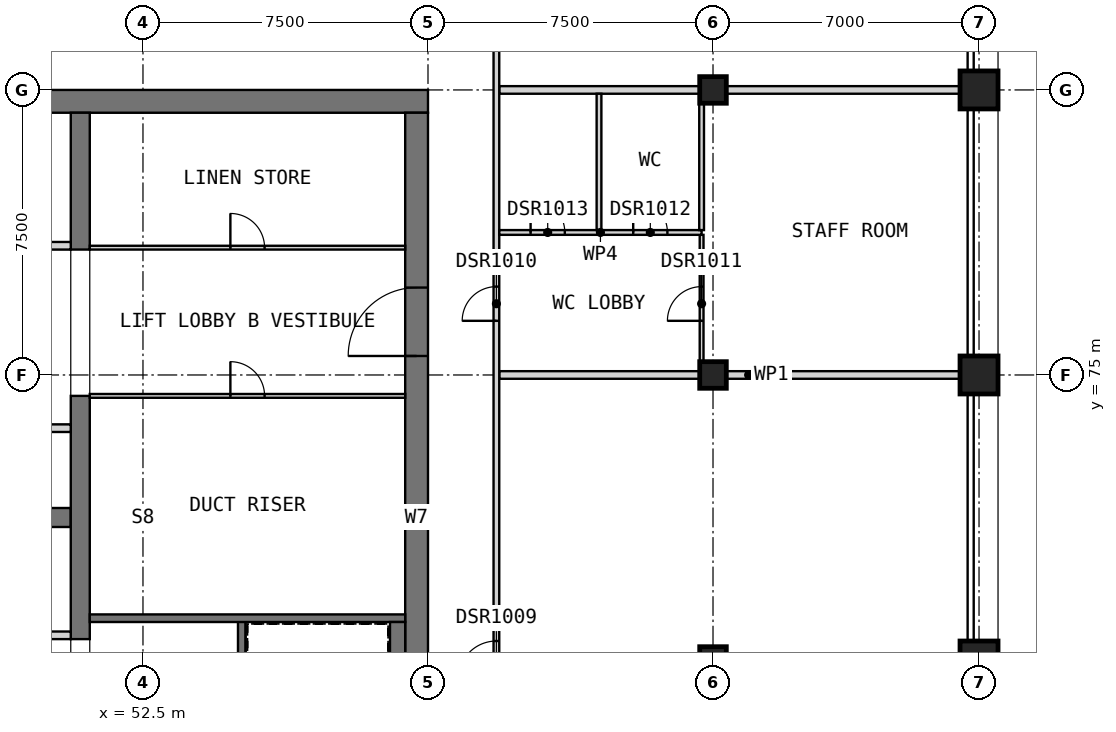
"""IFC4 building model, lengths in metres.
Left out: names, types, materials, properties, quantities, classifications, styles, units other than length and angle.
Written with IfcOpenShell. Run it as: python <this file> out.ifc"""

import sys

from ifc_helpers import new_model, si_unit, direction, frame, frame_2d, origin, origin_2d, place, context, subcontext, project, spatial, rectangle, extrude, element, fill, save


model = new_model("IFC4")
c1 = context("Model", 3, precision=1e-05, world=origin(), true_north=direction((0.0, 1.0)))
c2 = subcontext(c1, "Body", "Model", "MODEL_VIEW")
j1 = project(units=[si_unit("LENGTHUNIT", "METRE"), si_unit("PLANEANGLEUNIT", "RADIAN")], contexts=[c1])
p1 = place(None, origin())
s1 = spatial("IfcSite", under=j1, at=p1, CompositionType="ELEMENT")
p2 = place(p1, origin())
s2 = spatial("IfcBuilding", under=s1, at=p2, CompositionType="ELEMENT")
p3 = place(p2, frame((0.0, 0.0, 292.2)))
s3 = spatial("IfcBuildingStorey", under=s2, at=p3, CompositionType="ELEMENT", Elevation=292.2)
for number, where, z_axis, x_axis in (
    (1, (67.5, 67.5, 0.0), (0.0, 0.0, 1.0), (1.0, 0.0, 0.0)),
    (2, (67.5, 75.0, 0.0), (0.0, 0.0, 1.0), (1.0, 0.0, 0.0)),
    (3, (67.5, 82.5, 0.0), (0.0, 0.0, 1.0), (1.0, 0.0, 0.0)),
):
    element("IfcColumn", number, at=place(p3, frame(where, z_axis=z_axis, x_axis=x_axis)), inside=s3, PredefinedType="COLUMN", context=c2, shape_type="SweptSolid", body=[
        extrude(rectangle(XDim=0.7, YDim=0.7, at=origin_2d()), origin(), (0.0, 0.0, 1.0), 5.5),
    ])
for number, where, z_axis, x_axis in (
    (4, (74.5, 67.5, 0.0), (0.0, 0.0, 1.0), (1.0, 0.0, 0.0)),
    (5, (74.5, 75.0, 0.0), (0.0, 0.0, 1.0), (1.0, 0.0, 0.0)),
    (6, (74.5, 82.5, 0.0), (0.0, 0.0, 1.0), (1.0, 0.0, 0.0)),
):
    element("IfcColumn", number, at=place(p3, frame(where, z_axis=z_axis, x_axis=x_axis)), inside=s3, PredefinedType="COLUMN", context=c2, shape_type="SweptSolid", body=[
        extrude(rectangle(XDim=1.0, YDim=1.0, at=origin_2d()), origin(), (0.0, 0.0, 1.0), 5.5),
    ])
p4 = place(p3, frame((30.0, 82.2, 0.0), z_axis=(0.0, 0.0, 1.0), x_axis=(1.0, 0.0, 0.0)))
e7 = element("IfcWall", 7, at=p4, inside=s3, PredefinedType="SHEAR", context=c2, shape_type="SweptSolid", body=[
    extrude(rectangle(XDim=30.0, YDim=0.6, at=frame_2d((15.0, 0.0))), origin(), (0.0, 0.0, 1.0), 5.5),
])
p5 = place(p3, frame((59.7, 60.6, 0.0), z_axis=(0.0, 0.0, 1.0), x_axis=(0.0, 1.0, 0.0)))
e8 = element("IfcWall", 8, at=p5, inside=s3, PredefinedType="SHEAR", context=c2, shape_type="SweptSolid", body=[
    extrude(rectangle(XDim=21.3, YDim=0.6, at=frame_2d((10.65, 0.0))), origin(), (0.0, 0.0, 1.0), 5.5),
])
p6 = place(p5, frame((14.9, 0.0, 0.0)))
e9 = element("IfcOpeningElement", 9, at=p6, cuts=e8, PredefinedType="OPENING", context=c2, shape_type="SweptSolid", body=[
    extrude(rectangle(XDim=1.8, YDim=2.1, at=frame_2d((0.9, 1.05))), frame((0.0, 0.31, 0.0), z_axis=(0.0, -1.0, 0.0), x_axis=(1.0, 0.0, 0.0)), (0.0, 0.0, 1.0), 0.62),
])
p7 = place(p3, frame((35.0, 71.25, 0.0), z_axis=(0.0, 0.0, 1.0), x_axis=(1.0, 0.0, 0.0)))
e10 = element("IfcWall", 10, at=p7, inside=s3, PredefinedType="SHEAR", context=c2, shape_type="SweptSolid", body=[
    extrude(rectangle(XDim=15.6, YDim=0.5, at=frame_2d((7.8, 0.0))), origin(), (0.0, 0.0, 1.0), 5.5),
])
p8 = place(p3, frame((50.85, 68.05, 0.0), z_axis=(0.0, 0.0, 1.0), x_axis=(0.0, 1.0, 0.0)))
e11 = element("IfcWall", 11, at=p8, inside=s3, PredefinedType="SHEAR", context=c2, shape_type="SweptSolid", body=[
    extrude(rectangle(XDim=6.4, YDim=0.5, at=frame_2d((3.2, 0.0))), origin(), (0.0, 0.0, 1.0), 5.5),
])
p9 = place(p3, frame((50.85, 78.3, 0.0), z_axis=(0.0, 0.0, 1.0), x_axis=(0.0, 1.0, 0.0)))
e12 = element("IfcWall", 12, at=p9, inside=s3, PredefinedType="SHEAR", context=c2, shape_type="SweptSolid", body=[
    extrude(rectangle(XDim=3.6, YDim=0.5, at=frame_2d((1.8, 0.0))), origin(), (0.0, 0.0, 1.0), 5.5),
])
p10 = place(p3, frame((35.0, 68.15, 0.0), z_axis=(0.0, 0.0, 1.0), x_axis=(1.0, 0.0, 0.0)))
e13 = element("IfcWall", 13, at=p10, inside=s3, PredefinedType="PARTITIONING", context=c2, shape_type="SweptSolid", body=[
    extrude(rectangle(XDim=15.6, YDim=0.2, at=frame_2d((7.8, 0.0))), origin(), (0.0, 0.0, 1.0), 5.2),
])
p11 = place(p10, frame((2.675, 0.0, 0.0)))
e14 = element("IfcOpeningElement", 14, at=p11, cuts=e13, PredefinedType="OPENING", context=c2, shape_type="SweptSolid", body=[
    extrude(rectangle(XDim=0.9, YDim=2.1, at=frame_2d((0.45, 1.05))), frame((0.0, 0.11, 0.0), z_axis=(0.0, -1.0, 0.0), x_axis=(1.0, 0.0, 0.0)), (0.0, 0.0, 1.0), 0.22),
])
p12 = place(p10, frame((10.475, 0.0, 0.0)))
e15 = element("IfcOpeningElement", 15, at=p12, cuts=e13, PredefinedType="OPENING", context=c2, shape_type="SweptSolid", body=[
    extrude(rectangle(XDim=0.9, YDim=2.1, at=frame_2d((0.45, 1.05))), frame((0.0, 0.11, 0.0), z_axis=(0.0, -1.0, 0.0), x_axis=(1.0, 0.0, 0.0)), (0.0, 0.0, 1.0), 0.22),
])
p13 = place(p3, frame((35.0, 73.6, 0.0), z_axis=(0.0, 0.0, 1.0), x_axis=(1.0, 0.0, 0.0)))
e16 = element("IfcWall", 16, at=p13, inside=s3, PredefinedType="SOLIDWALL", context=c2, shape_type="SweptSolid", body=[
    extrude(rectangle(XDim=15.6, YDim=0.2, at=frame_2d((7.8, 0.0))), origin(), (0.0, 0.0, 1.0), 5.5),
])
p14 = place(p13, frame((0.75, 0.0, 0.0)))
e17 = element("IfcOpeningElement", 17, at=p14, cuts=e16, PredefinedType="OPENING", context=c2, shape_type="SweptSolid", body=[
    extrude(rectangle(XDim=1.1, YDim=2.1, at=frame_2d((0.55, 1.05))), frame((0.0, 0.11, 0.0), z_axis=(0.0, -1.0, 0.0), x_axis=(1.0, 0.0, 0.0)), (0.0, 0.0, 1.0), 0.22),
])
p15 = place(p13, frame((3.35, 0.0, 0.0)))
e18 = element("IfcOpeningElement", 18, at=p15, cuts=e16, PredefinedType="OPENING", context=c2, shape_type="SweptSolid", body=[
    extrude(rectangle(XDim=1.1, YDim=2.1, at=frame_2d((0.55, 1.05))), frame((0.0, 0.11, 0.0), z_axis=(0.0, -1.0, 0.0), x_axis=(1.0, 0.0, 0.0)), (0.0, 0.0, 1.0), 0.22),
])
p16 = place(p13, frame((5.95, 0.0, 0.0)))
e19 = element("IfcOpeningElement", 19, at=p16, cuts=e16, PredefinedType="OPENING", context=c2, shape_type="SweptSolid", body=[
    extrude(rectangle(XDim=1.1, YDim=2.1, at=frame_2d((0.55, 1.05))), frame((0.0, 0.11, 0.0), z_axis=(0.0, -1.0, 0.0), x_axis=(1.0, 0.0, 0.0)), (0.0, 0.0, 1.0), 0.22),
])
p17 = place(p13, frame((8.55, 0.0, 0.0)))
e20 = element("IfcOpeningElement", 20, at=p17, cuts=e16, PredefinedType="OPENING", context=c2, shape_type="SweptSolid", body=[
    extrude(rectangle(XDim=1.1, YDim=2.1, at=frame_2d((0.55, 1.05))), frame((0.0, 0.11, 0.0), z_axis=(0.0, -1.0, 0.0), x_axis=(1.0, 0.0, 0.0)), (0.0, 0.0, 1.0), 0.22),
])
p18 = place(p13, frame((11.15, 0.0, 0.0)))
e21 = element("IfcOpeningElement", 21, at=p18, cuts=e16, PredefinedType="OPENING", context=c2, shape_type="SweptSolid", body=[
    extrude(rectangle(XDim=1.1, YDim=2.1, at=frame_2d((0.55, 1.05))), frame((0.0, 0.11, 0.0), z_axis=(0.0, -1.0, 0.0), x_axis=(1.0, 0.0, 0.0)), (0.0, 0.0, 1.0), 0.22),
])
p19 = place(p13, frame((13.75, 0.0, 0.0)))
e22 = element("IfcOpeningElement", 22, at=p19, cuts=e16, PredefinedType="OPENING", context=c2, shape_type="SweptSolid", body=[
    extrude(rectangle(XDim=1.1, YDim=2.1, at=frame_2d((0.55, 1.05))), frame((0.0, 0.11, 0.0), z_axis=(0.0, -1.0, 0.0), x_axis=(1.0, 0.0, 0.0)), (0.0, 0.0, 1.0), 0.22),
])
p20 = place(p3, frame((35.0, 78.4, 0.0), z_axis=(0.0, 0.0, 1.0), x_axis=(1.0, 0.0, 0.0)))
e23 = element("IfcWall", 23, at=p20, inside=s3, PredefinedType="SOLIDWALL", context=c2, shape_type="SweptSolid", body=[
    extrude(rectangle(XDim=15.6, YDim=0.2, at=frame_2d((7.8, 0.0))), origin(), (0.0, 0.0, 1.0), 5.5),
])
p21 = place(p20, frame((0.75, 0.0, 0.0)))
e24 = element("IfcOpeningElement", 24, at=p21, cuts=e23, PredefinedType="OPENING", context=c2, shape_type="SweptSolid", body=[
    extrude(rectangle(XDim=1.1, YDim=2.1, at=frame_2d((0.55, 1.05))), frame((0.0, 0.11, 0.0), z_axis=(0.0, -1.0, 0.0), x_axis=(1.0, 0.0, 0.0)), (0.0, 0.0, 1.0), 0.22),
])
p22 = place(p20, frame((3.35, 0.0, 0.0)))
e25 = element("IfcOpeningElement", 25, at=p22, cuts=e23, PredefinedType="OPENING", context=c2, shape_type="SweptSolid", body=[
    extrude(rectangle(XDim=1.1, YDim=2.1, at=frame_2d((0.55, 1.05))), frame((0.0, 0.11, 0.0), z_axis=(0.0, -1.0, 0.0), x_axis=(1.0, 0.0, 0.0)), (0.0, 0.0, 1.0), 0.22),
])
p23 = place(p20, frame((11.15, 0.0, 0.0)))
e26 = element("IfcOpeningElement", 26, at=p23, cuts=e23, PredefinedType="OPENING", context=c2, shape_type="SweptSolid", body=[
    extrude(rectangle(XDim=1.1, YDim=2.1, at=frame_2d((0.55, 1.05))), frame((0.0, 0.11, 0.0), z_axis=(0.0, -1.0, 0.0), x_axis=(1.0, 0.0, 0.0)), (0.0, 0.0, 1.0), 0.22),
])
p24 = place(p20, frame((13.75, 0.0, 0.0)))
e27 = element("IfcOpeningElement", 27, at=p24, cuts=e23, PredefinedType="OPENING", context=c2, shape_type="SweptSolid", body=[
    extrude(rectangle(XDim=1.1, YDim=2.1, at=frame_2d((0.55, 1.05))), frame((0.0, 0.11, 0.0), z_axis=(0.0, -1.0, 0.0), x_axis=(1.0, 0.0, 0.0)), (0.0, 0.0, 1.0), 0.22),
])
p25 = place(p3, frame((55.1, 60.6, 0.0), z_axis=(0.0, 0.0, 1.0), x_axis=(0.0, 1.0, 0.0)))
e28 = element("IfcWall", 28, at=p25, inside=s3, PredefinedType="SOLIDWALL", context=c2, shape_type="SweptSolid", body=[
    extrude(rectangle(XDim=8.0, YDim=0.2, at=frame_2d((4.0, 0.0))), origin(), (0.0, 0.0, 1.0), 5.2),
])
p26 = place(p3, frame((51.1, 68.6, 0.0), z_axis=(0.0, 0.0, 1.0), x_axis=(1.0, 0.0, 0.0)))
e29 = element("IfcWall", 29, at=p26, inside=s3, PredefinedType="SOLIDWALL", context=c2, shape_type="SweptSolid", body=[
    extrude(rectangle(XDim=8.3, YDim=0.2, at=frame_2d((4.15, 0.0))), origin(), (0.0, 0.0, 1.0), 5.2),
])
p27 = place(p3, frame((59.2, 60.6, 0.0), z_axis=(0.0, 0.0, 1.0), x_axis=(0.0, 1.0, 0.0)))
e30 = element("IfcWall", 30, at=p27, inside=s3, PredefinedType="SOLIDWALL", context=c2, shape_type="SweptSolid", body=[
    extrude(rectangle(XDim=7.9, YDim=0.4, at=frame_2d((3.95, 0.0))), origin(), (0.0, 0.0, 1.0), 5.2),
])
p28 = place(p3, frame((51.1, 74.45, 0.0), z_axis=(0.0, 0.0, 1.0), x_axis=(1.0, 0.0, 0.0)))
e31 = element("IfcWall", 31, at=p28, inside=s3, PredefinedType="PARTITIONING", context=c2, shape_type="SweptSolid", body=[
    extrude(rectangle(XDim=8.3, YDim=0.1, at=frame_2d((4.15, 0.0))), origin(), (0.0, 0.0, 1.0), 5.2),
])
p29 = place(p28, frame((3.7, 0.0, 0.0)))
e32 = element("IfcOpeningElement", 32, at=p29, cuts=e31, PredefinedType="OPENING", context=c2, shape_type="SweptSolid", body=[
    extrude(rectangle(XDim=0.9, YDim=2.1, at=frame_2d((0.45, 1.05))), frame((0.0, 0.06, 0.0), z_axis=(0.0, -1.0, 0.0), x_axis=(1.0, 0.0, 0.0)), (0.0, 0.0, 1.0), 0.12),
])
p30 = place(p3, frame((51.1, 78.35, 0.0), z_axis=(0.0, 0.0, 1.0), x_axis=(1.0, 0.0, 0.0)))
e33 = element("IfcWall", 33, at=p30, inside=s3, PredefinedType="PARTITIONING", context=c2, shape_type="SweptSolid", body=[
    extrude(rectangle(XDim=8.3, YDim=0.1, at=frame_2d((4.15, 0.0))), origin(), (0.0, 0.0, 1.0), 5.2),
])
p31 = place(p30, frame((3.7, 0.0, 0.0)))
e34 = element("IfcOpeningElement", 34, at=p31, cuts=e33, PredefinedType="OPENING", context=c2, shape_type="SweptSolid", body=[
    extrude(rectangle(XDim=0.9, YDim=2.1, at=frame_2d((0.45, 1.05))), frame((0.0, 0.06, 0.0), z_axis=(0.0, -1.0, 0.0), x_axis=(1.0, 0.0, 0.0)), (0.0, 0.0, 1.0), 0.12),
])
for number, where, z_axis, x_axis in (
    (35, (61.875, 75.0, 0.0), (0.0, 0.0, 1.0), (1.0, 0.0, 0.0)),
    (36, (61.875, 82.5, 0.0), (0.0, 0.0, 1.0), (1.0, 0.0, 0.0)),
):
    element("IfcWall", number, at=place(p3, frame(where, z_axis=z_axis, x_axis=x_axis)), inside=s3, PredefinedType="PARTITIONING", context=c2, shape_type="SweptSolid", body=[
        extrude(rectangle(XDim=13.125, YDim=0.2, at=frame_2d((6.562, 0.0))), origin(), (0.0, 0.0, 1.0), 5.2),
    ])
p32 = place(p3, frame((61.8, 58.275, 0.0), z_axis=(0.0, 0.0, 1.0), x_axis=(0.0, 1.0, 0.0)))
e37 = element("IfcWall", 37, at=p32, inside=s3, PredefinedType="PARTITIONING", context=c2, shape_type="SweptSolid", body=[
    extrude(rectangle(XDim=25.95, YDim=0.15, at=frame_2d((12.975, 0.0))), origin(), (0.0, 0.0, 1.0), 5.2),
])
p33 = place(p32, frame((8.725, 0.0, 0.0)))
e38 = element("IfcOpeningElement", 38, at=p33, cuts=e37, PredefinedType="OPENING", context=c2, shape_type="SweptSolid", body=[
    extrude(rectangle(XDim=1.0, YDim=2.1, at=frame_2d((0.5, 1.05))), frame((0.0, 0.085, 0.0), z_axis=(0.0, -1.0, 0.0), x_axis=(1.0, 0.0, 0.0)), (0.0, 0.0, 1.0), 0.17),
])
p34 = place(p32, frame((18.15, 0.0, 0.0)))
e39 = element("IfcOpeningElement", 39, at=p34, cuts=e37, PredefinedType="OPENING", context=c2, shape_type="SweptSolid", body=[
    extrude(rectangle(XDim=0.9, YDim=2.1, at=frame_2d((0.45, 1.05))), frame((0.0, 0.085, 0.0), z_axis=(0.0, -1.0, 0.0), x_axis=(1.0, 0.0, 0.0)), (0.0, 0.0, 1.0), 0.17),
])
p35 = place(p3, frame((67.2, 75.1, 0.0), z_axis=(0.0, 0.0, 1.0), x_axis=(0.0, 1.0, 0.0)))
e40 = element("IfcWall", 40, at=p35, inside=s3, PredefinedType="PARTITIONING", context=c2, shape_type="SweptSolid", body=[
    extrude(rectangle(XDim=3.587, YDim=0.1, at=frame_2d((1.794, 0.0))), origin(), (0.0, 0.0, 1.0), 5.2),
])
p36 = place(p35, frame((1.325, 0.0, 0.0)))
e41 = element("IfcOpeningElement", 41, at=p36, cuts=e40, PredefinedType="OPENING", context=c2, shape_type="SweptSolid", body=[
    extrude(rectangle(XDim=0.9, YDim=2.1, at=frame_2d((0.45, 1.05))), frame((0.0, 0.06, 0.0), z_axis=(0.0, -1.0, 0.0), x_axis=(1.0, 0.0, 0.0)), (0.0, 0.0, 1.0), 0.12),
])
p37 = place(p3, frame((61.875, 78.75, 0.0), z_axis=(0.0, 0.0, 1.0), x_axis=(1.0, 0.0, 0.0)))
e42 = element("IfcWall", 42, at=p37, inside=s3, PredefinedType="PARTITIONING", context=c2, shape_type="SweptSolid", body=[
    extrude(rectangle(XDim=5.325, YDim=0.125, at=frame_2d((2.663, 0.0))), origin(), (0.0, 0.0, 1.0), 5.2),
])
p38 = place(p37, frame((3.525, 0.0, 0.0)))
e43 = element("IfcOpeningElement", 43, at=p38, cuts=e42, PredefinedType="OPENING", context=c2, shape_type="SweptSolid", body=[
    extrude(rectangle(XDim=0.9, YDim=2.1, at=frame_2d((0.45, 1.05))), frame((0.0, 0.073, 0.0), z_axis=(0.0, -1.0, 0.0), x_axis=(1.0, 0.0, 0.0)), (0.0, 0.0, 1.0), 0.145),
])
p39 = place(p37, frame((0.825, 0.0, 0.0)))
e44 = element("IfcOpeningElement", 44, at=p39, cuts=e42, PredefinedType="OPENING", context=c2, shape_type="SweptSolid", body=[
    extrude(rectangle(XDim=0.9, YDim=2.1, at=frame_2d((0.45, 1.05))), frame((0.0, 0.073, 0.0), z_axis=(0.0, -1.0, 0.0), x_axis=(1.0, 0.0, 0.0)), (0.0, 0.0, 1.0), 0.145),
])
for number, where, z_axis, x_axis in (
    (45, (64.5, 78.812, 0.0), (0.0, 0.0, 1.0), (0.0, 1.0, 0.0)),
    (46, (67.2, 78.812, 0.0), (0.0, 0.0, 1.0), (0.0, 1.0, 0.0)),
):
    element("IfcWall", number, at=place(p3, frame(where, z_axis=z_axis, x_axis=x_axis)), inside=s3, PredefinedType="PARTITIONING", context=c2, shape_type="SweptSolid", body=[
        extrude(rectangle(XDim=3.587, YDim=0.125, at=frame_2d((1.794, 0.0))), origin(), (0.0, 0.0, 1.0), 5.2),
    ])
p40 = place(p6, origin())
e47 = element("IfcDoor", 47, at=p40, inside=s3, OperationType="DOUBLE_DOOR_SINGLE_SWING", PredefinedType="DOOR", context=c2, shape_type="SweptSolid", body=[
    extrude(rectangle(XDim=1.8, YDim=2.1, at=frame_2d((0.9, 1.05))), frame((0.0, 0.025, 0.0), z_axis=(0.0, -1.0, 0.0), x_axis=(1.0, 0.0, 0.0)), (0.0, 0.0, 1.0), 0.05),
])
fill(e9, e47)
p41 = place(p29, origin())
e48 = element("IfcDoor", 48, at=p41, inside=s3, OperationType="SINGLE_SWING_LEFT", PredefinedType="DOOR", context=c2, shape_type="SweptSolid", body=[
    extrude(rectangle(XDim=0.9, YDim=2.1, at=frame_2d((0.45, 1.05))), frame((0.0, 0.025, 0.0), z_axis=(0.0, -1.0, 0.0), x_axis=(1.0, 0.0, 0.0)), (0.0, 0.0, 1.0), 0.05),
])
fill(e32, e48)
p42 = place(p31, origin())
e49 = element("IfcDoor", 49, at=p42, inside=s3, OperationType="SINGLE_SWING_LEFT", PredefinedType="DOOR", context=c2, shape_type="SweptSolid", body=[
    extrude(rectangle(XDim=0.9, YDim=2.1, at=frame_2d((0.45, 1.05))), frame((0.0, 0.025, 0.0), z_axis=(0.0, -1.0, 0.0), x_axis=(1.0, 0.0, 0.0)), (0.0, 0.0, 1.0), 0.05),
])
fill(e34, e49)
p43 = place(p33, origin())
e50 = element("IfcDoor", 50, at=p43, inside=s3, OperationType="SINGLE_SWING_RIGHT", PredefinedType="DOOR", context=c2, shape_type="SweptSolid", body=[
    extrude(rectangle(XDim=1.0, YDim=2.1, at=frame_2d((0.5, 1.05))), frame((0.0, 0.025, 0.0), z_axis=(0.0, -1.0, 0.0), x_axis=(1.0, 0.0, 0.0)), (0.0, 0.0, 1.0), 0.05),
])
fill(e38, e50)
p44 = place(p34, origin())
e51 = element("IfcDoor", 51, at=p44, inside=s3, OperationType="SINGLE_SWING_RIGHT", PredefinedType="DOOR", context=c2, shape_type="SweptSolid", body=[
    extrude(rectangle(XDim=0.9, YDim=2.1, at=frame_2d((0.45, 1.05))), frame((0.0, 0.025, 0.0), z_axis=(0.0, -1.0, 0.0), x_axis=(1.0, 0.0, 0.0)), (0.0, 0.0, 1.0), 0.05),
])
fill(e39, e51)
p45 = place(p36, origin())
e52 = element("IfcDoor", 52, at=p45, inside=s3, OperationType="SINGLE_SWING_LEFT", PredefinedType="DOOR", context=c2, shape_type="SweptSolid", body=[
    extrude(rectangle(XDim=0.9, YDim=2.1, at=frame_2d((0.45, 1.05))), frame((0.0, 0.025, 0.0), z_axis=(0.0, -1.0, 0.0), x_axis=(1.0, 0.0, 0.0)), (0.0, 0.0, 1.0), 0.05),
])
fill(e41, e52)
p46 = place(p38, origin())
e53 = element("IfcDoor", 53, at=p46, inside=s3, OperationType="SINGLE_SWING_LEFT", PredefinedType="DOOR", context=c2, shape_type="SweptSolid", body=[
    extrude(rectangle(XDim=0.9, YDim=2.1, at=frame_2d((0.45, 1.05))), frame((0.0, 0.025, 0.0), z_axis=(0.0, -1.0, 0.0), x_axis=(1.0, 0.0, 0.0)), (0.0, 0.0, 1.0), 0.05),
])
fill(e43, e53)
p47 = place(p39, origin())
e54 = element("IfcDoor", 54, at=p47, inside=s3, OperationType="SINGLE_SWING_LEFT", PredefinedType="DOOR", context=c2, shape_type="SweptSolid", body=[
    extrude(rectangle(XDim=0.9, YDim=2.1, at=frame_2d((0.45, 1.05))), frame((0.0, 0.025, 0.0), z_axis=(0.0, -1.0, 0.0), x_axis=(1.0, 0.0, 0.0)), (0.0, 0.0, 1.0), 0.05),
])
fill(e44, e54)
save(model, sys.argv[1])
